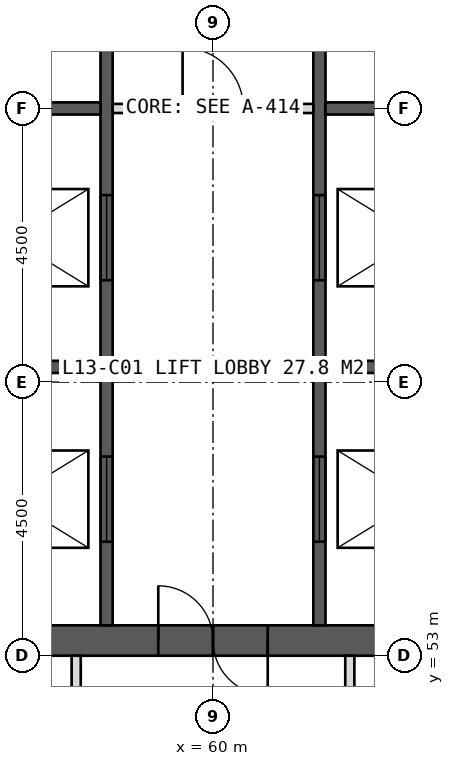
"""IFC4 building model, lengths in metres.
Left out: names, types, materials, properties, quantities, classifications, styles, units other than length and angle.
Written with IfcOpenShell. Run it as: python <this file> out.ifc"""

import sys

from ifc_helpers import new_model, si_unit, direction, frame, frame_2d, origin, place, context, subcontext, project, spatial, rectangle, extrude, element, fill, save


model = new_model("IFC4")
c1 = context("Model", 3, precision=1e-05, world=origin(), true_north=direction((0.0, 1.0)))
c2 = subcontext(c1, "Body", "Model", "MODEL_VIEW")
j1 = project(units=[si_unit("LENGTHUNIT", "METRE"), si_unit("PLANEANGLEUNIT", "RADIAN")], contexts=[c1])
p1 = place(None, origin())
s1 = spatial("IfcSite", under=j1, at=p1, CompositionType="ELEMENT")
p2 = place(p1, origin())
s2 = spatial("IfcBuilding", under=s1, at=p2, CompositionType="ELEMENT")
p3 = place(p2, frame((0.0, 0.0, 59.0)))
s3 = spatial("IfcBuildingStorey", under=s2, at=p3, CompositionType="ELEMENT", Elevation=59.0)
p4 = place(p3, frame((51.0, 53.25, 0.0), z_axis=(0.0, 0.0, 1.0), x_axis=(1.0, 0.0, 0.0)))
e1 = element("IfcWall", 1, at=p4, inside=s3, PredefinedType="SHEAR", context=c2, shape_type="SweptSolid", body=[
    extrude(rectangle(XDim=18.0, YDim=0.5, at=frame_2d((9.0, 0.0))), origin(), (0.0, 0.0, 1.0), 4.0),
])
p5 = place(p4, frame((8.1, 0.0, 0.0)))
e2 = element("IfcOpeningElement", 2, at=p5, cuts=e1, PredefinedType="OPENING", context=c2, shape_type="SweptSolid", body=[
    extrude(rectangle(XDim=1.8, YDim=2.2, at=frame_2d((0.9, 1.1))), frame((0.0, 0.26, 0.0), z_axis=(0.0, -1.0, 0.0), x_axis=(1.0, 0.0, 0.0)), (0.0, 0.0, 1.0), 0.52),
])
p6 = place(p3, frame((58.25, 53.5, 0.0), z_axis=(0.0, 0.0, 1.0), x_axis=(0.0, 1.0, 0.0)))
e3 = element("IfcWall", 3, at=p6, inside=s3, PredefinedType="SHEAR", context=c2, shape_type="SweptSolid", body=[
    extrude(rectangle(XDim=17.0, YDim=0.2, at=frame_2d((8.5, 0.0))), origin(), (0.0, 0.0, 1.0), 4.0),
])
p7 = place(p6, frame((1.375, 0.0, 0.0)))
e4 = element("IfcOpeningElement", 4, at=p7, cuts=e3, PredefinedType="OPENING", context=c2, shape_type="SweptSolid", body=[
    extrude(rectangle(XDim=1.4, YDim=2.2, at=frame_2d((0.7, 1.1))), frame((0.0, 0.11, 0.0), z_axis=(0.0, -1.0, 0.0), x_axis=(1.0, 0.0, 0.0)), (0.0, 0.0, 1.0), 0.22),
])
p8 = place(p6, frame((5.675, 0.0, 0.0)))
e5 = element("IfcOpeningElement", 5, at=p8, cuts=e3, PredefinedType="OPENING", context=c2, shape_type="SweptSolid", body=[
    extrude(rectangle(XDim=1.4, YDim=2.2, at=frame_2d((0.7, 1.1))), frame((0.0, 0.11, 0.0), z_axis=(0.0, -1.0, 0.0), x_axis=(1.0, 0.0, 0.0)), (0.0, 0.0, 1.0), 0.22),
])
p9 = place(p3, frame((61.75, 53.5, 0.0), z_axis=(0.0, 0.0, 1.0), x_axis=(0.0, 1.0, 0.0)))
e6 = element("IfcWall", 6, at=p9, inside=s3, PredefinedType="SHEAR", context=c2, shape_type="SweptSolid", body=[
    extrude(rectangle(XDim=17.0, YDim=0.2, at=frame_2d((8.5, 0.0))), origin(), (0.0, 0.0, 1.0), 4.0),
])
p10 = place(p9, frame((1.375, 0.0, 0.0)))
e7 = element("IfcOpeningElement", 7, at=p10, cuts=e6, PredefinedType="OPENING", context=c2, shape_type="SweptSolid", body=[
    extrude(rectangle(XDim=1.4, YDim=2.2, at=frame_2d((0.7, 1.1))), frame((0.0, 0.11, 0.0), z_axis=(0.0, -1.0, 0.0), x_axis=(1.0, 0.0, 0.0)), (0.0, 0.0, 1.0), 0.22),
])
p11 = place(p9, frame((5.675, 0.0, 0.0)))
e8 = element("IfcOpeningElement", 8, at=p11, cuts=e6, PredefinedType="OPENING", context=c2, shape_type="SweptSolid", body=[
    extrude(rectangle(XDim=1.4, YDim=2.2, at=frame_2d((0.7, 1.1))), frame((0.0, 0.11, 0.0), z_axis=(0.0, -1.0, 0.0), x_axis=(1.0, 0.0, 0.0)), (0.0, 0.0, 1.0), 0.22),
])
for number, where, z_axis, x_axis in (
    (9, (55.1, 57.75, 0.0), (0.0, 0.0, 1.0), (1.0, 0.0, 0.0)),
    (10, (61.85, 57.75, 0.0), (0.0, 0.0, 1.0), (1.0, 0.0, 0.0)),
    (11, (55.1, 62.0, 0.0), (0.0, 0.0, 1.0), (1.0, 0.0, 0.0)),
    (12, (61.85, 62.0, 0.0), (0.0, 0.0, 1.0), (1.0, 0.0, 0.0)),
):
    element("IfcWall", number, at=place(p3, frame(where, z_axis=z_axis, x_axis=x_axis)), inside=s3, PredefinedType="SHEAR", context=c2, shape_type="SweptSolid", body=[
        extrude(rectangle(XDim=3.05, YDim=0.2, at=frame_2d((1.525, 0.0))), origin(), (0.0, 0.0, 1.0), 4.0),
    ])
for number, where, z_axis, x_axis in (
    (13, (62.25, 53.0, 0.0), (0.0, 0.0, 1.0), (0.0, -1.0, 0.0)),
    (14, (57.75, 53.0, 0.0), (0.0, 0.0, 1.0), (0.0, -1.0, 0.0)),
):
    element("IfcWall", number, at=place(p3, frame(where, z_axis=z_axis, x_axis=x_axis)), inside=s3, PredefinedType="PARTITIONING", context=c2, shape_type="SweptSolid", body=[
        extrude(rectangle(XDim=7.2, YDim=0.15, at=frame_2d((3.6, 0.0))), origin(), (0.0, 0.0, 1.0), 3.75),
    ])
p12 = place(p3, frame((58.35, 62.0, 0.0), z_axis=(0.0, 0.0, 1.0), x_axis=(1.0, 0.0, 0.0)))
e15 = element("IfcWall", 15, at=p12, inside=s3, PredefinedType="PARTITIONING", context=c2, shape_type="SweptSolid", body=[
    extrude(rectangle(XDim=3.3, YDim=0.15, at=frame_2d((1.65, 0.0))), origin(), (0.0, 0.0, 1.0), 3.75),
])
p13 = place(p12, frame((1.15, 0.0, 0.0)))
e16 = element("IfcOpeningElement", 16, at=p13, cuts=e15, PredefinedType="OPENING", context=c2, shape_type="SweptSolid", body=[
    extrude(rectangle(XDim=1.0, YDim=2.1, at=frame_2d((0.5, 1.05))), frame((0.0, 0.085, 0.0), z_axis=(0.0, -1.0, 0.0), x_axis=(1.0, 0.0, 0.0)), (0.0, 0.0, 1.0), 0.17),
])
p14 = place(p5, origin())
e17 = element("IfcDoor", 17, at=p14, inside=s3, OperationType="DOUBLE_DOOR_SINGLE_SWING", PredefinedType="DOOR", context=c2, shape_type="SweptSolid", body=[
    extrude(rectangle(XDim=1.8, YDim=2.2, at=frame_2d((0.9, 1.1))), frame((0.0, 0.025, 0.0), z_axis=(0.0, -1.0, 0.0), x_axis=(1.0, 0.0, 0.0)), (0.0, 0.0, 1.0), 0.05),
])
fill(e2, e17)
p15 = place(p7, origin())
e18 = element("IfcDoor", 18, at=p15, inside=s3, OperationType="SLIDING_TO_LEFT", PredefinedType="DOOR", context=c2, shape_type="SweptSolid", body=[
    extrude(rectangle(XDim=1.4, YDim=2.2, at=frame_2d((0.7, 1.1))), frame((0.0, 0.025, 0.0), z_axis=(0.0, -1.0, 0.0), x_axis=(1.0, 0.0, 0.0)), (0.0, 0.0, 1.0), 0.05),
])
fill(e4, e18)
p16 = place(p10, origin())
e19 = element("IfcDoor", 19, at=p16, inside=s3, OperationType="SLIDING_TO_LEFT", PredefinedType="DOOR", context=c2, shape_type="SweptSolid", body=[
    extrude(rectangle(XDim=1.4, YDim=2.2, at=frame_2d((0.7, 1.1))), frame((0.0, 0.025, 0.0), z_axis=(0.0, -1.0, 0.0), x_axis=(1.0, 0.0, 0.0)), (0.0, 0.0, 1.0), 0.05),
])
fill(e7, e19)
p17 = place(p8, origin())
e20 = element("IfcDoor", 20, at=p17, inside=s3, OperationType="SLIDING_TO_LEFT", PredefinedType="DOOR", context=c2, shape_type="SweptSolid", body=[
    extrude(rectangle(XDim=1.4, YDim=2.2, at=frame_2d((0.7, 1.1))), frame((0.0, 0.025, 0.0), z_axis=(0.0, -1.0, 0.0), x_axis=(1.0, 0.0, 0.0)), (0.0, 0.0, 1.0), 0.05),
])
fill(e5, e20)
p18 = place(p11, origin())
e21 = element("IfcDoor", 21, at=p18, inside=s3, OperationType="SLIDING_TO_LEFT", PredefinedType="DOOR", context=c2, shape_type="SweptSolid", body=[
    extrude(rectangle(XDim=1.4, YDim=2.2, at=frame_2d((0.7, 1.1))), frame((0.0, 0.025, 0.0), z_axis=(0.0, -1.0, 0.0), x_axis=(1.0, 0.0, 0.0)), (0.0, 0.0, 1.0), 0.05),
])
fill(e8, e21)
p19 = place(p13, origin())
e22 = element("IfcDoor", 22, at=p19, inside=s3, OperationType="SINGLE_SWING_LEFT", PredefinedType="DOOR", context=c2, shape_type="SweptSolid", body=[
    extrude(rectangle(XDim=1.0, YDim=2.1, at=frame_2d((0.5, 1.05))), frame((0.0, 0.025, 0.0), z_axis=(0.0, -1.0, 0.0), x_axis=(1.0, 0.0, 0.0)), (0.0, 0.0, 1.0), 0.05),
])
fill(e16, e22)
save(model, sys.argv[1])
